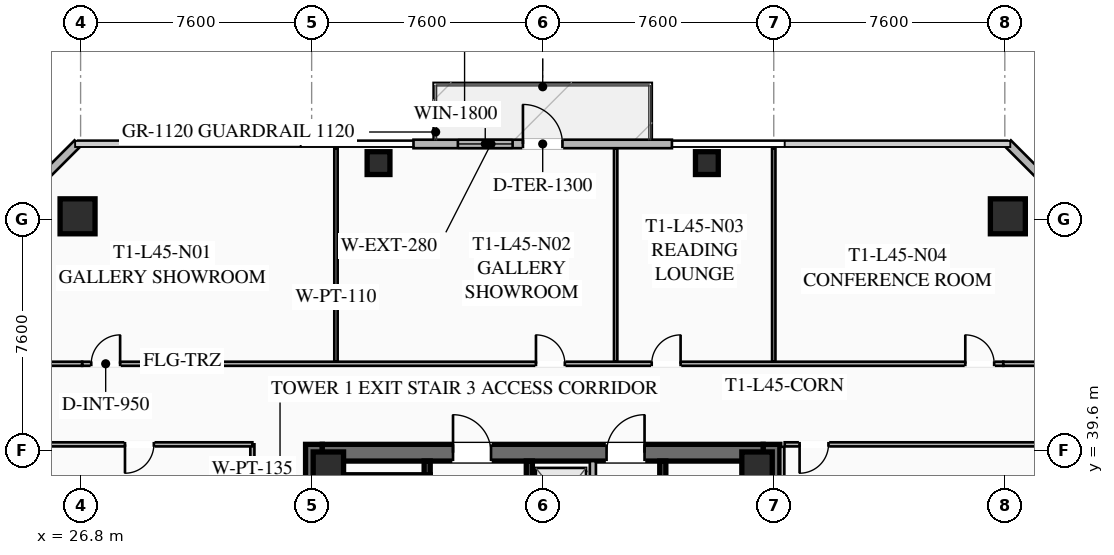
"""IFC4 building model, lengths in metres.
Left out: names, types, materials, properties, quantities, classifications, styles, units other than length and angle.
Written with IfcOpenShell. Run it as: python <this file> out.ifc"""

import sys

from ifc_helpers import new_model, si_unit, direction, frame, frame_2d, origin, origin_2d, place, context, subcontext, project, spatial, rectangle, hollow_rectangle, extrude, element, fill, save


model = new_model("IFC4")
c1 = context("Model", 3, precision=1e-05, world=origin(), true_north=direction((0.0, 1.0)))
c2 = subcontext(c1, "Body", "Model", "MODEL_VIEW")
j1 = project(units=[si_unit("LENGTHUNIT", "METRE"), si_unit("PLANEANGLEUNIT", "RADIAN")], contexts=[c1])
p1 = place(None, origin())
s1 = spatial("IfcSite", under=j1, at=p1, CompositionType="ELEMENT")
p2 = place(p1, origin())
s2 = spatial("IfcBuilding", under=s1, at=p2, CompositionType="ELEMENT")
p3 = place(p2, frame((0.0, 0.0, 167.65)))
s3 = spatial("IfcBuildingStorey", under=s2, at=p3, CompositionType="ELEMENT", Elevation=167.65)
for number, where, z_axis, x_axis in (
    (1, (34.475, 24.2, 0.0), (0.0, 0.0, 1.0), (0.0, 1.0, 0.0)),
    (2, (49.525, 39.8, 0.0), (0.0, 0.0, 1.0), (0.0, -1.0, 0.0)),
):
    element("IfcWall", number, at=place(p3, frame(where, z_axis=z_axis, x_axis=x_axis)), inside=s3, PredefinedType="SHEAR", context=c2, shape_type="SweptSolid", body=[
        extrude(rectangle(XDim=15.6, YDim=0.55, at=frame_2d((7.8, 0.0))), origin(), (0.0, 0.0, 1.0), 3.55),
    ])
p4 = place(p3, frame((34.75, 39.525, 0.0), z_axis=(0.0, 0.0, 1.0), x_axis=(1.0, 0.0, 0.0)))
e3 = element("IfcWall", 3, at=p4, inside=s3, PredefinedType="SHEAR", context=c2, shape_type="SweptSolid", body=[
    extrude(rectangle(XDim=14.5, YDim=0.55, at=frame_2d((7.25, 0.0))), origin(), (0.0, 0.0, 1.0), 3.55),
])
p5 = place(p4, frame((4.3, 0.0, 0.0)))
e4 = element("IfcOpeningElement", 4, at=p5, cuts=e3, PredefinedType="OPENING", context=c2, shape_type="SweptSolid", body=[
    extrude(rectangle(XDim=1.25, YDim=2.25, at=frame_2d((0.625, 1.125))), frame((0.0, 0.285, 0.0), z_axis=(0.0, -1.0, 0.0), x_axis=(1.0, 0.0, 0.0)), (0.0, 0.0, 1.0), 0.57),
])
p6 = place(p4, frame((9.35, 0.0, 0.0)))
e5 = element("IfcOpeningElement", 5, at=p6, cuts=e3, PredefinedType="OPENING", context=c2, shape_type="SweptSolid", body=[
    extrude(rectangle(XDim=1.25, YDim=2.25, at=frame_2d((0.625, 1.125))), frame((0.0, 0.285, 0.0), z_axis=(0.0, -1.0, 0.0), x_axis=(1.0, 0.0, 0.0)), (0.0, 0.0, 1.0), 0.57),
])
for number, where, z_axis, x_axis in (
    (6, (49.05, 39.05, 0.0), (0.0, 0.0, 1.0), (1.0, 0.0, 0.0)),
    (7, (34.95, 39.05, 0.0), (0.0, 0.0, 1.0), (1.0, 0.0, 0.0)),
):
    element("IfcColumn", number, at=place(p3, frame(where, z_axis=z_axis, x_axis=x_axis)), inside=s3, PredefinedType="COLUMN", context=c2, shape_type="SweptSolid", body=[
        extrude(hollow_rectangle(XDim=1.0, YDim=1.0, WallThickness=0.04, at=origin_2d()), origin(), (0.0, 0.0, 1.0), 3.37),
    ])
for number, where, z_axis, x_axis in (
    (8, (57.3, 47.3, 0.0), (0.0, 0.0, 1.0), (1.0, 0.0, 0.0)),
    (9, (26.7, 47.3, 0.0), (0.0, 0.0, 1.0), (1.0, 0.0, 0.0)),
):
    element("IfcColumn", number, at=place(p3, frame(where, z_axis=z_axis, x_axis=x_axis)), inside=s3, PredefinedType="COLUMN", context=c2, shape_type="SweptSolid", body=[
        extrude(hollow_rectangle(XDim=1.15, YDim=1.15, WallThickness=0.045, at=origin_2d()), origin(), (0.0, 0.0, 1.0), 3.37),
    ])
for number, where, z_axis, x_axis in (
    (10, (47.4, 49.05, 0.0), (0.0, 0.0, 1.0), (1.0, 0.0, 0.0)),
    (11, (36.6, 49.05, 0.0), (0.0, 0.0, 1.0), (1.0, 0.0, 0.0)),
):
    element("IfcColumn", number, at=place(p3, frame(where, z_axis=z_axis, x_axis=x_axis)), inside=s3, PredefinedType="COLUMN", context=c2, shape_type="SweptSolid", body=[
        extrude(hollow_rectangle(XDim=0.75, YDim=0.75, WallThickness=0.032, at=origin_2d()), origin(), (0.0, 0.0, 1.0), 3.37),
    ])
p7 = place(p3, frame((37.75, 49.68, 0.0), z_axis=(0.0, 0.0, 1.0), x_axis=(1.0, 0.0, 0.0)))
e12 = element("IfcWall", 12, at=p7, inside=s3, PredefinedType="SOLIDWALL", context=c2, shape_type="SweptSolid", body=[
    extrude(rectangle(XDim=8.5, YDim=0.28, at=frame_2d((4.25, 0.0))), origin(), (0.0, 0.0, 1.0), 3.37),
])
p8 = place(p7, frame((3.6, 0.0, 0.0)))
e13 = element("IfcOpeningElement", 13, at=p8, cuts=e12, PredefinedType="OPENING", context=c2, shape_type="SweptSolid", body=[
    extrude(rectangle(XDim=1.3, YDim=2.15, at=frame_2d((0.65, 1.075))), frame((0.0, 0.15, 0.0), z_axis=(0.0, -1.0, 0.0), x_axis=(1.0, 0.0, 0.0)), (0.0, 0.0, 1.0), 0.3),
])
p9 = place(p7, frame((1.46, 0.0, 0.85)))
e14 = element("IfcOpeningElement", 14, at=p9, cuts=e12, PredefinedType="OPENING", context=c2, shape_type="SweptSolid", body=[
    extrude(rectangle(XDim=1.8, YDim=1.92, at=frame_2d((0.9, 0.96))), frame((0.0, 0.15, 0.0), z_axis=(0.0, -1.0, 0.0), x_axis=(1.0, 0.0, 0.0)), (0.0, 0.0, 1.0), 0.3),
])
for number, where, z_axis, x_axis in (
    (15, (24.3, 47.3, 0.0), (0.0, 0.0, 1.0), (0.707, 0.707, 0.0)),
    (16, (57.3, 49.7, 0.0), (0.0, 0.0, 1.0), (0.707, -0.707, 0.0)),
):
    element("IfcWall", number, at=place(p3, frame(where, z_axis=z_axis, x_axis=x_axis)), inside=s3, PredefinedType="SOLIDWALL", context=c2, shape_type="SweptSolid", body=[
        extrude(rectangle(XDim=3.394, YDim=0.28, at=frame_2d((1.697, 0.0))), origin(), (0.0, 0.0, 1.0), 3.37),
    ])
p10 = place(p3, frame((38.2, 31.2, 0.0), z_axis=(0.0, 0.0, 1.0), x_axis=(0.0, 1.0, 0.0)))
e17 = element("IfcWall", 17, at=p10, inside=s3, PredefinedType="SHEAR", context=c2, shape_type="SweptSolid", body=[
    extrude(rectangle(XDim=8.05, YDim=0.2, at=frame_2d((4.025, 0.0))), origin(), (0.0, 0.0, 1.0), 3.37),
])
p11 = place(p10, frame((0.45, 0.0, 0.0)))
e18 = element("IfcOpeningElement", 18, at=p11, cuts=e17, PredefinedType="OPENING", context=c2, shape_type="SweptSolid", body=[
    extrude(rectangle(XDim=1.15, YDim=2.2, at=frame_2d((0.575, 1.1))), frame((0.0, 0.11, 0.0), z_axis=(0.0, -1.0, 0.0), x_axis=(1.0, 0.0, 0.0)), (0.0, 0.0, 1.0), 0.22),
])
p12 = place(p3, frame((41.56, 24.75, 0.0), z_axis=(0.0, 0.0, 1.0), x_axis=(0.0, 1.0, 0.0)))
e19 = element("IfcWall", 19, at=p12, inside=s3, PredefinedType="SHEAR", context=c2, shape_type="SweptSolid", body=[
    extrude(rectangle(XDim=14.5, YDim=0.2, at=frame_2d((7.25, 0.0))), origin(), (0.0, 0.0, 1.0), 3.37),
])
p13 = place(p3, frame((45.95, 39.25, 0.0), z_axis=(0.0, 0.0, 1.0), x_axis=(0.0, -1.0, 0.0)))
e20 = element("IfcWall", 20, at=p13, inside=s3, PredefinedType="SHEAR", context=c2, shape_type="SweptSolid", body=[
    extrude(rectangle(XDim=6.45, YDim=0.2, at=frame_2d((3.225, 0.0))), origin(), (0.0, 0.0, 1.0), 3.37),
])
p14 = place(p3, frame((43.65, 32.35, 0.0), z_axis=(0.0, 0.0, 1.0), x_axis=(0.0, 1.0, 0.0)))
e21 = element("IfcWall", 21, at=p14, inside=s3, PredefinedType="SOLIDWALL", context=c2, shape_type="SweptSolid", body=[
    extrude(rectangle(XDim=6.9, YDim=0.2, at=frame_2d((3.45, 0.0))), origin(), (0.0, 0.0, 1.0), 3.37),
])
p15 = place(p14, frame((0.575, 0.0, 0.0)))
e22 = element("IfcOpeningElement", 22, at=p15, cuts=e21, PredefinedType="OPENING", context=c2, shape_type="SweptSolid", body=[
    extrude(rectangle(XDim=1.1, YDim=2.2, at=frame_2d((0.55, 1.1))), frame((0.0, 0.11, 0.0), z_axis=(0.0, -1.0, 0.0), x_axis=(1.0, 0.0, 0.0)), (0.0, 0.0, 1.0), 0.22),
])
p16 = place(p14, frame((2.825, 0.0, 0.0)))
e23 = element("IfcOpeningElement", 23, at=p16, cuts=e21, PredefinedType="OPENING", context=c2, shape_type="SweptSolid", body=[
    extrude(rectangle(XDim=1.1, YDim=2.2, at=frame_2d((0.55, 1.1))), frame((0.0, 0.11, 0.0), z_axis=(0.0, -1.0, 0.0), x_axis=(1.0, 0.0, 0.0)), (0.0, 0.0, 1.0), 0.22),
])
p17 = place(p14, frame((5.075, 0.0, 0.0)))
e24 = element("IfcOpeningElement", 24, at=p17, cuts=e21, PredefinedType="OPENING", context=c2, shape_type="SweptSolid", body=[
    extrude(rectangle(XDim=1.1, YDim=2.2, at=frame_2d((0.55, 1.1))), frame((0.0, 0.11, 0.0), z_axis=(0.0, -1.0, 0.0), x_axis=(1.0, 0.0, 0.0)), (0.0, 0.0, 1.0), 0.22),
])
p18 = place(p3, frame((32.45, 35.4, 0.0), z_axis=(0.0, 0.0, 1.0), x_axis=(0.0, 1.0, 0.0)))
e25 = element("IfcWall", 25, at=p18, inside=s3, PredefinedType="PARTITIONING", context=c2, shape_type="SweptSolid", body=[
    extrude(rectangle(XDim=4.4, YDim=0.135, at=frame_2d((2.2, 0.0))), origin(), (0.0, 0.0, 1.0), 2.723),
])
p19 = place(p3, frame((26.85, 42.45, 0.0), z_axis=(0.0, 0.0, 1.0), x_axis=(1.0, 0.0, 0.0)))
e26 = element("IfcWall", 26, at=p19, inside=s3, PredefinedType="PARTITIONING", context=c2, shape_type="SweptSolid", body=[
    extrude(rectangle(XDim=30.3, YDim=0.135, at=frame_2d((15.15, 0.0))), origin(), (0.0, 0.0, 1.0), 2.723),
])
p20 = place(p19, frame((0.3, 0.0, 0.0)))
e27 = element("IfcOpeningElement", 27, at=p20, cuts=e26, PredefinedType="OPENING", context=c2, shape_type="SweptSolid", body=[
    extrude(rectangle(XDim=0.95, YDim=2.05, at=frame_2d((0.475, 1.025))), frame((0.0, 0.077, 0.0), z_axis=(0.0, -1.0, 0.0), x_axis=(1.0, 0.0, 0.0)), (0.0, 0.0, 1.0), 0.155),
])
p21 = place(p19, frame((14.929, 0.0, 0.0)))
e28 = element("IfcOpeningElement", 28, at=p21, cuts=e26, PredefinedType="OPENING", context=c2, shape_type="SweptSolid", body=[
    extrude(rectangle(XDim=0.95, YDim=2.05, at=frame_2d((0.475, 1.025))), frame((0.0, 0.077, 0.0), z_axis=(0.0, -1.0, 0.0), x_axis=(1.0, 0.0, 0.0)), (0.0, 0.0, 1.0), 0.155),
])
p22 = place(p19, frame((18.735, 0.0, 0.0)))
e29 = element("IfcOpeningElement", 29, at=p22, cuts=e26, PredefinedType="OPENING", context=c2, shape_type="SweptSolid", body=[
    extrude(rectangle(XDim=0.95, YDim=2.05, at=frame_2d((0.475, 1.025))), frame((0.0, 0.077, 0.0), z_axis=(0.0, -1.0, 0.0), x_axis=(1.0, 0.0, 0.0)), (0.0, 0.0, 1.0), 0.155),
])
p23 = place(p19, frame((29.05, 0.0, 0.0)))
e30 = element("IfcOpeningElement", 30, at=p23, cuts=e26, PredefinedType="OPENING", context=c2, shape_type="SweptSolid", body=[
    extrude(rectangle(XDim=0.95, YDim=2.05, at=frame_2d((0.475, 1.025))), frame((0.0, 0.077, 0.0), z_axis=(0.0, -1.0, 0.0), x_axis=(1.0, 0.0, 0.0)), (0.0, 0.0, 1.0), 0.155),
])
for number, where, z_axis, x_axis in (
    (31, (24.32, 42.45, 0.0), (0.0, 0.0, 1.0), (1.0, 0.0, 0.0)),
    (32, (57.15, 42.45, 0.0), (0.0, 0.0, 1.0), (1.0, 0.0, 0.0)),
):
    element("IfcWall", number, at=place(p3, frame(where, z_axis=z_axis, x_axis=x_axis)), inside=s3, PredefinedType="PARTITIONING", context=c2, shape_type="SweptSolid", body=[
        extrude(rectangle(XDim=2.53, YDim=0.135, at=frame_2d((1.265, 0.0))), origin(), (0.0, 0.0, 1.0), 2.723),
    ])
for number, where, z_axis, x_axis in (
    (33, (35.2, 42.53, 0.0), (0.0, 0.0, 1.0), (0.0, 1.0, 0.0)),
    (34, (44.4, 42.53, 0.0), (0.0, 0.0, 1.0), (0.0, 1.0, 0.0)),
    (35, (49.6, 42.53, 0.0), (0.0, 0.0, 1.0), (0.0, 1.0, 0.0)),
):
    element("IfcWall", number, at=place(p3, frame(where, z_axis=z_axis, x_axis=x_axis)), inside=s3, PredefinedType="PARTITIONING", context=c2, shape_type="SweptSolid", body=[
        extrude(rectangle(XDim=7.0, YDim=0.11, at=frame_2d((3.5, 0.0))), origin(), (0.0, 0.0, 1.0), 2.723),
    ])
p24 = place(p3, frame((49.88, 39.72, 0.0), z_axis=(0.0, 0.0, 1.0), x_axis=(0.0, -1.0, 0.0)))
e36 = element("IfcWall", 36, at=p24, inside=s3, PredefinedType="PARTITIONING", context=c2, shape_type="SweptSolid", body=[
    extrude(rectangle(XDim=15.44, YDim=0.135, at=frame_2d((7.72, 0.0))), origin(), (0.0, 0.0, 1.0), 2.723),
])
p25 = place(p3, frame((59.68, 39.8, 0.0), z_axis=(0.0, 0.0, 1.0), x_axis=(-1.0, 0.0, 0.0)))
e37 = element("IfcWall", 37, at=p25, inside=s3, PredefinedType="PARTITIONING", context=c2, shape_type="SweptSolid", body=[
    extrude(rectangle(XDim=9.72, YDim=0.135, at=frame_2d((4.86, 0.0))), origin(), (0.0, 0.0, 1.0), 2.723),
])
p26 = place(p25, frame((8.28, 0.0, 0.0)))
e38 = element("IfcOpeningElement", 38, at=p26, cuts=e37, PredefinedType="OPENING", context=c2, shape_type="SweptSolid", body=[
    extrude(rectangle(XDim=0.95, YDim=2.05, at=frame_2d((0.475, 1.025))), frame((0.0, 0.077, 0.0), z_axis=(0.0, -1.0, 0.0), x_axis=(1.0, 0.0, 0.0)), (0.0, 0.0, 1.0), 0.155),
])
p27 = place(p3, frame((32.45, 39.8, 0.0), z_axis=(0.0, 0.0, 1.0), x_axis=(-1.0, 0.0, 0.0)))
e39 = element("IfcWall", 39, at=p27, inside=s3, PredefinedType="PARTITIONING", context=c2, shape_type="SweptSolid", body=[
    extrude(rectangle(XDim=8.13, YDim=0.135, at=frame_2d((4.065, 0.0))), origin(), (0.0, 0.0, 1.0), 2.723),
])
p28 = place(p27, frame((3.24, 0.0, 0.0)))
e40 = element("IfcOpeningElement", 40, at=p28, cuts=e39, PredefinedType="OPENING", context=c2, shape_type="SweptSolid", body=[
    extrude(rectangle(XDim=0.95, YDim=2.05, at=frame_2d((0.475, 1.025))), frame((0.0, 0.077, 0.0), z_axis=(0.0, -1.0, 0.0), x_axis=(1.0, 0.0, 0.0)), (0.0, 0.0, 1.0), 0.155),
])
p29 = place(p8, origin())
e41 = element("IfcDoor", 41, at=p29, inside=s3, OperationType="SINGLE_SWING_LEFT", PredefinedType="DOOR", context=c2, shape_type="SweptSolid", body=[
    extrude(rectangle(XDim=1.3, YDim=2.15, at=frame_2d((0.65, 1.075))), frame((0.0, 0.025, 0.0), z_axis=(0.0, -1.0, 0.0), x_axis=(1.0, 0.0, 0.0)), (0.0, 0.0, 1.0), 0.05),
])
fill(e13, e41)
p30 = place(p9, origin())
e42 = element("IfcWindow", 42, at=p30, inside=s3, PartitioningType="SINGLE_PANEL", PredefinedType="WINDOW", context=c2, shape_type="SweptSolid", body=[
    extrude(rectangle(XDim=1.8, YDim=1.92, at=frame_2d((0.9, 0.96))), frame((0.0, 0.03, 0.0), z_axis=(0.0, -1.0, 0.0), x_axis=(1.0, 0.0, 0.0)), (0.0, 0.0, 1.0), 0.06),
])
fill(e14, e42)
p31 = place(p5, origin())
e43 = element("IfcDoor", 43, at=p31, inside=s3, OperationType="SINGLE_SWING_LEFT", PredefinedType="DOOR", context=c2, shape_type="SweptSolid", body=[
    extrude(rectangle(XDim=1.25, YDim=2.25, at=frame_2d((0.625, 1.125))), frame((0.0, 0.025, 0.0), z_axis=(0.0, -1.0, 0.0), x_axis=(1.0, 0.0, 0.0)), (0.0, 0.0, 1.0), 0.05),
])
fill(e4, e43)
p32 = place(p6, origin())
e44 = element("IfcDoor", 44, at=p32, inside=s3, OperationType="SINGLE_SWING_RIGHT", PredefinedType="DOOR", context=c2, shape_type="SweptSolid", body=[
    extrude(rectangle(XDim=1.25, YDim=2.25, at=frame_2d((0.625, 1.125))), frame((0.0, 0.025, 0.0), z_axis=(0.0, -1.0, 0.0), x_axis=(1.0, 0.0, 0.0)), (0.0, 0.0, 1.0), 0.05),
])
fill(e5, e44)
p33 = place(p20, origin())
e45 = element("IfcDoor", 45, at=p33, inside=s3, OperationType="SINGLE_SWING_RIGHT", PredefinedType="DOOR", context=c2, shape_type="SweptSolid", body=[
    extrude(rectangle(XDim=0.95, YDim=2.05, at=frame_2d((0.475, 1.025))), frame((0.0, 0.025, 0.0), z_axis=(0.0, -1.0, 0.0), x_axis=(1.0, 0.0, 0.0)), (0.0, 0.0, 1.0), 0.05),
])
fill(e27, e45)
p34 = place(p21, origin())
e46 = element("IfcDoor", 46, at=p34, inside=s3, OperationType="SINGLE_SWING_LEFT", PredefinedType="DOOR", context=c2, shape_type="SweptSolid", body=[
    extrude(rectangle(XDim=0.95, YDim=2.05, at=frame_2d((0.475, 1.025))), frame((0.0, 0.025, 0.0), z_axis=(0.0, -1.0, 0.0), x_axis=(1.0, 0.0, 0.0)), (0.0, 0.0, 1.0), 0.05),
])
fill(e28, e46)
p35 = place(p22, origin())
e47 = element("IfcDoor", 47, at=p35, inside=s3, OperationType="SINGLE_SWING_RIGHT", PredefinedType="DOOR", context=c2, shape_type="SweptSolid", body=[
    extrude(rectangle(XDim=0.95, YDim=2.05, at=frame_2d((0.475, 1.025))), frame((0.0, 0.025, 0.0), z_axis=(0.0, -1.0, 0.0), x_axis=(1.0, 0.0, 0.0)), (0.0, 0.0, 1.0), 0.05),
])
fill(e29, e47)
p36 = place(p23, origin())
e48 = element("IfcDoor", 48, at=p36, inside=s3, OperationType="SINGLE_SWING_LEFT", PredefinedType="DOOR", context=c2, shape_type="SweptSolid", body=[
    extrude(rectangle(XDim=0.95, YDim=2.05, at=frame_2d((0.475, 1.025))), frame((0.0, 0.025, 0.0), z_axis=(0.0, -1.0, 0.0), x_axis=(1.0, 0.0, 0.0)), (0.0, 0.0, 1.0), 0.05),
])
fill(e30, e48)
p37 = place(p26, origin())
e49 = element("IfcDoor", 49, at=p37, inside=s3, OperationType="SINGLE_SWING_RIGHT", PredefinedType="DOOR", context=c2, shape_type="SweptSolid", body=[
    extrude(rectangle(XDim=0.95, YDim=2.05, at=frame_2d((0.475, 1.025))), frame((0.0, 0.025, 0.0), z_axis=(0.0, -1.0, 0.0), x_axis=(1.0, 0.0, 0.0)), (0.0, 0.0, 1.0), 0.05),
])
fill(e38, e49)
p38 = place(p28, origin())
e50 = element("IfcDoor", 50, at=p38, inside=s3, OperationType="SINGLE_SWING_RIGHT", PredefinedType="DOOR", context=c2, shape_type="SweptSolid", body=[
    extrude(rectangle(XDim=0.95, YDim=2.05, at=frame_2d((0.475, 1.025))), frame((0.0, 0.025, 0.0), z_axis=(0.0, -1.0, 0.0), x_axis=(1.0, 0.0, 0.0)), (0.0, 0.0, 1.0), 0.05),
])
fill(e40, e50)
save(model, sys.argv[1])
